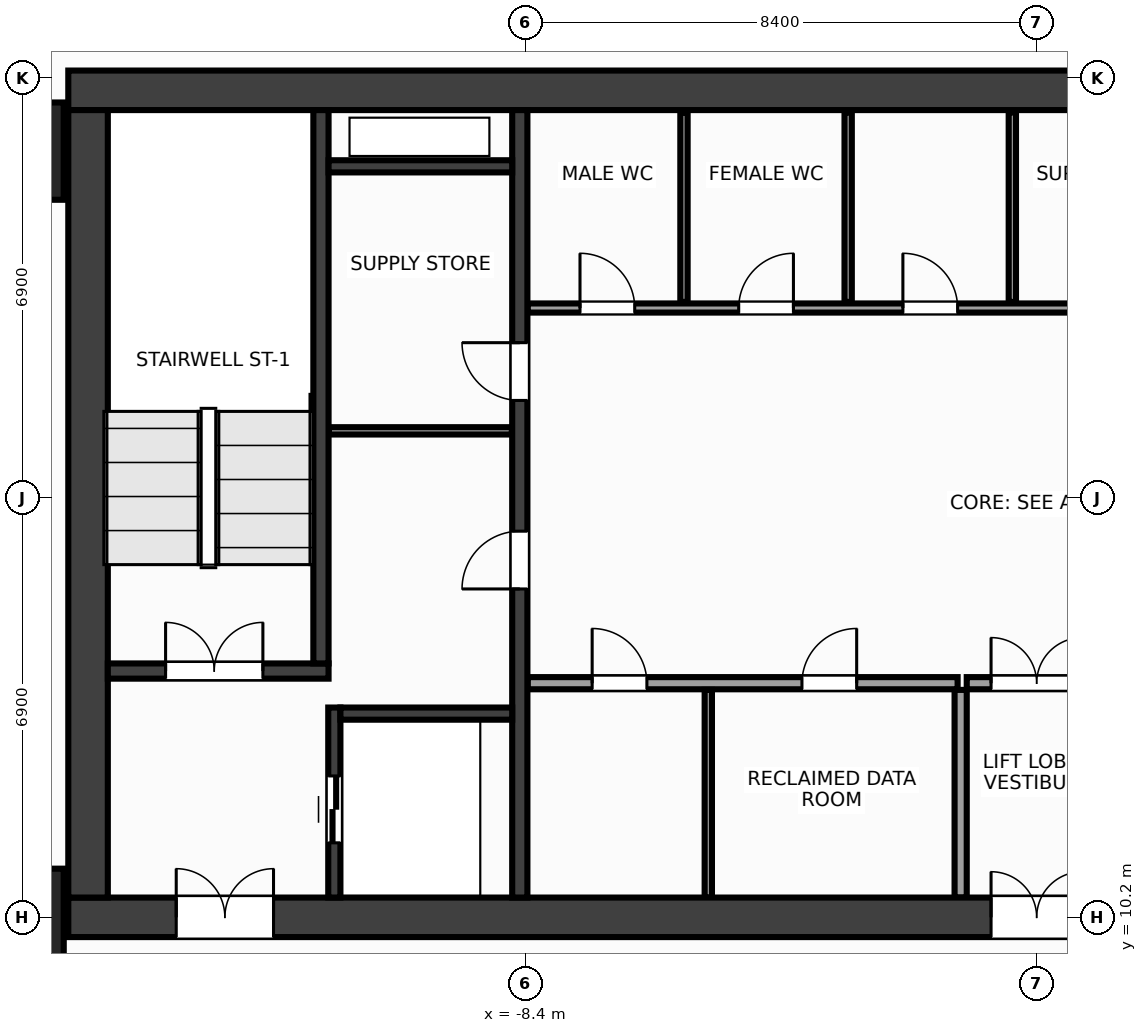
"""IFC4 building model, lengths in metres.
Left out: names, types, materials, properties, quantities, classifications, styles, units other than length and angle.
Written with IfcOpenShell. Run it as: python <this file> out.ifc"""

import sys

from ifc_helpers import new_model, si_unit, direction, frame, frame_2d, origin, origin_2d, place, context, subcontext, project, spatial, rectangle, extrude, source, transform, mapped, element, fill, save


model = new_model("IFC4")
c1 = context("Model", 3, precision=1e-05, world=origin(), true_north=direction((0.0, 1.0)))
c2 = subcontext(c1, "Body", "Model", "MODEL_VIEW")
j1 = project(units=[si_unit("LENGTHUNIT", "METRE"), si_unit("PLANEANGLEUNIT", "RADIAN")], contexts=[c1])
p1 = place(None, origin())
s1 = spatial("IfcSite", under=j1, at=p1, CompositionType="ELEMENT")
p2 = place(p1, origin())
s2 = spatial("IfcBuilding", under=s1, at=p2, CompositionType="ELEMENT")
p3 = place(p2, frame((0.0, 0.0, 92.0)))
s3 = spatial("IfcBuildingStorey", under=s2, at=p3, CompositionType="ELEMENT", Elevation=92.0)
m1 = source(origin(), c2, "Body", "SweptSolid", [
    extrude(rectangle(XDim=31.85, YDim=0.65, at=frame_2d((15.925, 0.0))), origin(), (0.0, 0.0, 1.0), 3.6),
])
p4 = place(p3, frame((-15.925, 23.8, 0.0), z_axis=(0.0, 0.0, 1.0), x_axis=(1.0, 0.0, 0.0)))
e1 = element("IfcWall", 1, at=p4, inside=s3, PredefinedType="SHEAR", context=c2, shape_type="MappedRepresentation", body=[
    mapped(m1, transform((0.0, 0.0, 0.0), x_axis=(1.0, 0.0, 0.0), y_axis=(0.0, 1.0, 0.0), z_axis=(0.0, 0.0, 1.0), scale=1.0)),
])
p5 = place(p3, frame((-15.925, 10.2, 0.0), z_axis=(0.0, 0.0, 1.0), x_axis=(1.0, 0.0, 0.0)))
e2 = element("IfcWall", 2, at=p5, inside=s3, PredefinedType="SHEAR", context=c2, shape_type="MappedRepresentation", body=[
    mapped(m1, transform((0.0, 0.0, 0.0), x_axis=(1.0, 0.0, 0.0), y_axis=(0.0, 1.0, 0.0), z_axis=(0.0, 0.0, 1.0), scale=1.0)),
])
p6 = place(p5, frame((1.775, 0.0, 0.0)))
e3 = element("IfcOpeningElement", 3, at=p6, cuts=e2, PredefinedType="OPENING", context=c2, shape_type="SweptSolid", body=[
    extrude(rectangle(XDim=1.6, YDim=2.15, at=frame_2d((0.8, 1.075))), frame((0.0, 0.337, 0.0), z_axis=(0.0, -1.0, 0.0), x_axis=(1.0, 0.0, 0.0)), (0.0, 0.0, 1.0), 0.674),
])
p7 = place(p5, frame((28.475, 0.0, 0.0)))
e4 = element("IfcOpeningElement", 4, at=p7, cuts=e2, PredefinedType="OPENING", context=c2, shape_type="SweptSolid", body=[
    extrude(rectangle(XDim=1.6, YDim=2.15, at=frame_2d((0.8, 1.075))), frame((0.0, 0.337, 0.0), z_axis=(0.0, -1.0, 0.0), x_axis=(1.0, 0.0, 0.0)), (0.0, 0.0, 1.0), 0.674),
])
p8 = place(p5, frame((15.175, 0.0, 0.0)))
e5 = element("IfcOpeningElement", 5, at=p8, cuts=e2, PredefinedType="OPENING", context=c2, shape_type="SweptSolid", body=[
    extrude(rectangle(XDim=1.5, YDim=2.2, at=frame_2d((0.75, 1.1))), frame((0.0, 0.337, 0.0), z_axis=(0.0, -1.0, 0.0), x_axis=(1.0, 0.0, 0.0)), (0.0, 0.0, 1.0), 0.674),
])
m2 = source(origin(), c2, "Body", "SweptSolid", [
    extrude(rectangle(XDim=12.95, YDim=0.65, at=frame_2d((6.475, 0.0))), origin(), (0.0, 0.0, 1.0), 3.6),
])
p9 = place(p3, frame((-15.6, 10.525, 0.0), z_axis=(0.0, 0.0, 1.0), x_axis=(0.0, 1.0, 0.0)))
e6 = element("IfcWall", 6, at=p9, inside=s3, PredefinedType="SHEAR", context=c2, shape_type="MappedRepresentation", body=[
    mapped(m2, transform((0.0, 0.0, 0.0), x_axis=(1.0, 0.0, 0.0), y_axis=(0.0, 1.0, 0.0), z_axis=(0.0, 0.0, 1.0), scale=1.0)),
])
m3 = source(origin(), c2, "Body", "SweptSolid", [
    extrude(rectangle(XDim=12.95, YDim=0.25, at=frame_2d((6.475, 0.0))), origin(), (0.0, 0.0, 1.0), 3.6),
])
p10 = place(p3, frame((-8.5, 10.525, 0.0), z_axis=(0.0, 0.0, 1.0), x_axis=(0.0, 1.0, 0.0)))
e7 = element("IfcWall", 7, at=p10, inside=s3, PredefinedType="SHEAR", context=c2, shape_type="MappedRepresentation", body=[
    mapped(m3, transform((0.0, 0.0, 0.0), x_axis=(1.0, 0.0, 0.0), y_axis=(0.0, 1.0, 0.0), z_axis=(0.0, 0.0, 1.0), scale=1.0)),
])
p11 = place(p10, frame((5.075, 0.0, 0.0)))
e8 = element("IfcOpeningElement", 8, at=p11, cuts=e7, PredefinedType="OPENING", context=c2, shape_type="SweptSolid", body=[
    extrude(rectangle(XDim=0.95, YDim=2.15, at=frame_2d((0.475, 1.075))), frame((0.0, 0.137, 0.0), z_axis=(0.0, -1.0, 0.0), x_axis=(1.0, 0.0, 0.0)), (0.0, 0.0, 1.0), 0.274),
])
p12 = place(p10, frame((8.175, 0.0, 0.0)))
e9 = element("IfcOpeningElement", 9, at=p12, cuts=e7, PredefinedType="OPENING", context=c2, shape_type="SweptSolid", body=[
    extrude(rectangle(XDim=0.95, YDim=2.15, at=frame_2d((0.475, 1.075))), frame((0.0, 0.137, 0.0), z_axis=(0.0, -1.0, 0.0), x_axis=(1.0, 0.0, 0.0)), (0.0, 0.0, 1.0), 0.274),
])
m4 = source(origin(), c2, "Body", "SweptSolid", [
    extrude(rectangle(XDim=3.63, YDim=0.25, at=frame_2d((1.815, 0.0))), origin(), (0.0, 0.0, 1.0), 3.6),
])
p13 = place(p3, frame((-15.275, 14.25, 0.0), z_axis=(0.0, 0.0, 1.0), x_axis=(1.0, 0.0, 0.0)))
e10 = element("IfcWall", 10, at=p13, inside=s3, PredefinedType="SHEAR", context=c2, shape_type="MappedRepresentation", body=[
    mapped(m4, transform((0.0, 0.0, 0.0), x_axis=(1.0, 0.0, 0.0), y_axis=(0.0, 1.0, 0.0), z_axis=(0.0, 0.0, 1.0), scale=1.0)),
])
p14 = place(p13, frame((0.95, 0.0, 0.0)))
e11 = element("IfcOpeningElement", 11, at=p14, cuts=e10, PredefinedType="OPENING", context=c2, shape_type="SweptSolid", body=[
    extrude(rectangle(XDim=1.6, YDim=2.15, at=frame_2d((0.8, 1.075))), frame((0.0, 0.137, 0.0), z_axis=(0.0, -1.0, 0.0), x_axis=(1.0, 0.0, 0.0)), (0.0, 0.0, 1.0), 0.274),
])
m5 = source(origin(), c2, "Body", "SweptSolid", [
    extrude(rectangle(XDim=9.1, YDim=0.25, at=frame_2d((4.55, 0.0))), origin(), (0.0, 0.0, 1.0), 3.6),
])
p15 = place(p3, frame((-11.77, 14.375, 0.0), z_axis=(0.0, 0.0, 1.0), x_axis=(0.0, 1.0, 0.0)))
e12 = element("IfcWall", 12, at=p15, inside=s3, PredefinedType="SHEAR", context=c2, shape_type="MappedRepresentation", body=[
    mapped(m5, transform((0.0, 0.0, 0.0), x_axis=(1.0, 0.0, 0.0), y_axis=(0.0, 1.0, 0.0), z_axis=(0.0, 0.0, 1.0), scale=1.0)),
])
m6 = source(origin(), c2, "Body", "SweptSolid", [
    extrude(rectangle(XDim=3.125, YDim=0.2, at=frame_2d((1.562, 0.0))), origin(), (0.0, 0.0, 1.0), 3.6),
])
p16 = place(p3, frame((-11.55, 10.525, 0.0), z_axis=(0.0, 0.0, 1.0), x_axis=(0.0, 1.0, 0.0)))
e13 = element("IfcWall", 13, at=p16, inside=s3, PredefinedType="SHEAR", context=c2, shape_type="MappedRepresentation", body=[
    mapped(m6, transform((0.0, 0.0, 0.0), x_axis=(1.0, 0.0, 0.0), y_axis=(0.0, 1.0, 0.0), z_axis=(0.0, 0.0, 1.0), scale=1.0)),
])
p17 = place(p16, frame((0.9, 0.0, 0.0)))
e14 = element("IfcOpeningElement", 14, at=p17, cuts=e13, PredefinedType="OPENING", context=c2, shape_type="SweptSolid", body=[
    extrude(rectangle(XDim=1.1, YDim=2.15, at=frame_2d((0.55, 1.075))), frame((0.0, 0.112, 0.0), z_axis=(0.0, -1.0, 0.0), x_axis=(1.0, 0.0, 0.0)), (0.0, 0.0, 1.0), 0.224),
])
m7 = source(origin(), c2, "Body", "SweptSolid", [
    extrude(rectangle(XDim=2.825, YDim=0.2, at=frame_2d((1.413, 0.0))), origin(), (0.0, 0.0, 1.0), 3.6),
])
p18 = place(p3, frame((-11.45, 13.55, 0.0), z_axis=(0.0, 0.0, 1.0), x_axis=(1.0, 0.0, 0.0)))
e15 = element("IfcWall", 15, at=p18, inside=s3, PredefinedType="SHEAR", context=c2, shape_type="MappedRepresentation", body=[
    mapped(m7, transform((0.0, 0.0, 0.0), x_axis=(1.0, 0.0, 0.0), y_axis=(0.0, 1.0, 0.0), z_axis=(0.0, 0.0, 1.0), scale=1.0)),
])
m8 = source(origin(), c2, "Body", "SweptSolid", [
    extrude(rectangle(XDim=3.02, YDim=0.2, at=frame_2d((1.51, 0.0))), origin(), (0.0, 0.0, 1.0), 3.6),
])
p19 = place(p3, frame((-11.645, 22.55, 0.0), z_axis=(0.0, 0.0, 1.0), x_axis=(1.0, 0.0, 0.0)))
e16 = element("IfcWall", 16, at=p19, inside=s3, PredefinedType="SHEAR", context=c2, shape_type="MappedRepresentation", body=[
    mapped(m8, transform((0.0, 0.0, 0.0), x_axis=(1.0, 0.0, 0.0), y_axis=(0.0, 1.0, 0.0), z_axis=(0.0, 0.0, 1.0), scale=1.0)),
])
m9 = source(origin(), c2, "Body", "SweptSolid", [
    extrude(rectangle(XDim=1.6, YDim=1.6, at=origin_2d()), origin(), (0.0, 0.0, 1.0), 3.6),
])
for number, where, z_axis, x_axis in (
    (17, (-16.8, 10.2, 0.0), (0.0, 0.0, 1.0), (1.0, 0.0, 0.0)),
    (18, (-16.8, 22.8, 0.0), (0.0, 0.0, 1.0), (1.0, 0.0, 0.0)),
):
    element("IfcColumn", number, at=place(p3, frame(where, z_axis=z_axis, x_axis=x_axis)), inside=s3, PredefinedType="COLUMN", context=c2, shape_type="MappedRepresentation", body=[
        mapped(m9, transform((0.0, 0.0, 0.0), x_axis=(1.0, 0.0, 0.0), y_axis=(0.0, 1.0, 0.0), z_axis=(0.0, 0.0, 1.0), scale=1.0)),
    ])
m10 = source(origin(), c2, "Body", "SweptSolid", [
    extrude(rectangle(XDim=3.01, YDim=0.12, at=frame_2d((1.505, 0.0))), origin(), (0.0, 0.0, 1.0), 3.36),
])
p20 = place(p3, frame((-11.64, 18.2, 0.0), z_axis=(0.0, 0.0, 1.0), x_axis=(1.0, 0.0, 0.0)))
e19 = element("IfcWall", 19, at=p20, inside=s3, PredefinedType="PARTITIONING", context=c2, shape_type="MappedRepresentation", body=[
    mapped(m10, transform((0.0, 0.0, 0.0), x_axis=(1.0, 0.0, 0.0), y_axis=(0.0, 1.0, 0.0), z_axis=(0.0, 0.0, 1.0), scale=1.0)),
])
m11 = source(origin(), c2, "Body", "SweptSolid", [
    extrude(rectangle(XDim=7.07, YDim=0.2, at=frame_2d((3.535, 0.0))), origin(), (0.0, 0.0, 1.0), 3.36),
])
p21 = place(p3, frame((-8.37, 14.05, 0.0), z_axis=(0.0, 0.0, 1.0), x_axis=(1.0, 0.0, 0.0)))
e20 = element("IfcWall", 20, at=p21, inside=s3, PredefinedType="PARTITIONING", context=c2, shape_type="MappedRepresentation", body=[
    mapped(m11, transform((0.0, 0.0, 0.0), x_axis=(1.0, 0.0, 0.0), y_axis=(0.0, 1.0, 0.0), z_axis=(0.0, 0.0, 1.0), scale=1.0)),
])
p22 = place(p21, frame((1.06, 0.0, 0.0)))
e21 = element("IfcOpeningElement", 21, at=p22, cuts=e20, PredefinedType="OPENING", context=c2, shape_type="SweptSolid", body=[
    extrude(rectangle(XDim=0.9, YDim=2.15, at=frame_2d((0.45, 1.075))), frame((0.0, 0.112, 0.0), z_axis=(0.0, -1.0, 0.0), x_axis=(1.0, 0.0, 0.0)), (0.0, 0.0, 1.0), 0.224),
])
p23 = place(p21, frame((4.51, 0.0, 0.0)))
e22 = element("IfcOpeningElement", 22, at=p23, cuts=e20, PredefinedType="OPENING", context=c2, shape_type="SweptSolid", body=[
    extrude(rectangle(XDim=0.9, YDim=2.15, at=frame_2d((0.45, 1.075))), frame((0.0, 0.112, 0.0), z_axis=(0.0, -1.0, 0.0), x_axis=(1.0, 0.0, 0.0)), (0.0, 0.0, 1.0), 0.224),
])
m12 = source(origin(), c2, "Body", "SweptSolid", [
    extrude(rectangle(XDim=3.415, YDim=0.2, at=frame_2d((1.708, 0.0))), origin(), (0.0, 0.0, 1.0), 3.36),
])
p24 = place(p3, frame((-1.25, 10.525, 0.0), z_axis=(0.0, 0.0, 1.0), x_axis=(0.0, 1.0, 0.0)))
e23 = element("IfcWall", 23, at=p24, inside=s3, PredefinedType="PARTITIONING", context=c2, shape_type="MappedRepresentation", body=[
    mapped(m12, transform((0.0, 0.0, 0.0), x_axis=(1.0, 0.0, 0.0), y_axis=(0.0, 1.0, 0.0), z_axis=(0.0, 0.0, 1.0), scale=1.0)),
])
m13 = source(origin(), c2, "Body", "SweptSolid", [
    extrude(rectangle(XDim=2.3, YDim=0.2, at=frame_2d((1.15, 0.0))), origin(), (0.0, 0.0, 1.0), 3.36),
])
p25 = place(p3, frame((-1.15, 14.05, 0.0), z_axis=(0.0, 0.0, 1.0), x_axis=(1.0, 0.0, 0.0)))
e24 = element("IfcWall", 24, at=p25, inside=s3, PredefinedType="PARTITIONING", context=c2, shape_type="MappedRepresentation", body=[
    mapped(m13, transform((0.0, 0.0, 0.0), x_axis=(1.0, 0.0, 0.0), y_axis=(0.0, 1.0, 0.0), z_axis=(0.0, 0.0, 1.0), scale=1.0)),
])
p26 = place(p25, frame((0.4, 0.0, 0.0)))
e25 = element("IfcOpeningElement", 25, at=p26, cuts=e24, PredefinedType="OPENING", context=c2, shape_type="SweptSolid", body=[
    extrude(rectangle(XDim=1.5, YDim=2.2, at=frame_2d((0.75, 1.1))), frame((0.0, 0.112, 0.0), z_axis=(0.0, -1.0, 0.0), x_axis=(1.0, 0.0, 0.0)), (0.0, 0.0, 1.0), 0.224),
])
m14 = source(origin(), c2, "Body", "SweptSolid", [
    extrude(rectangle(XDim=14.59, YDim=0.15, at=frame_2d((7.295, 0.0))), origin(), (0.0, 0.0, 1.0), 3.36),
])
p27 = place(p3, frame((-8.37, 20.22, 0.0), z_axis=(0.0, 0.0, 1.0), x_axis=(1.0, 0.0, 0.0)))
e26 = element("IfcWall", 26, at=p27, inside=s3, PredefinedType="PARTITIONING", context=c2, shape_type="MappedRepresentation", body=[
    mapped(m14, transform((0.0, 0.0, 0.0), x_axis=(1.0, 0.0, 0.0), y_axis=(0.0, 1.0, 0.0), z_axis=(0.0, 0.0, 1.0), scale=1.0)),
])
p28 = place(p27, frame((0.86, 0.0, 0.0)))
e27 = element("IfcOpeningElement", 27, at=p28, cuts=e26, PredefinedType="OPENING", context=c2, shape_type="SweptSolid", body=[
    extrude(rectangle(XDim=0.9, YDim=2.15, at=frame_2d((0.45, 1.075))), frame((0.0, 0.087, 0.0), z_axis=(0.0, -1.0, 0.0), x_axis=(1.0, 0.0, 0.0)), (0.0, 0.0, 1.0), 0.174),
])
p29 = place(p27, frame((3.47, 0.0, 0.0)))
e28 = element("IfcOpeningElement", 28, at=p29, cuts=e26, PredefinedType="OPENING", context=c2, shape_type="SweptSolid", body=[
    extrude(rectangle(XDim=0.9, YDim=2.15, at=frame_2d((0.45, 1.075))), frame((0.0, 0.087, 0.0), z_axis=(0.0, -1.0, 0.0), x_axis=(1.0, 0.0, 0.0)), (0.0, 0.0, 1.0), 0.174),
])
p30 = place(p27, frame((6.17, 0.0, 0.0)))
e29 = element("IfcOpeningElement", 29, at=p30, cuts=e26, PredefinedType="OPENING", context=c2, shape_type="SweptSolid", body=[
    extrude(rectangle(XDim=0.9, YDim=2.15, at=frame_2d((0.45, 1.075))), frame((0.0, 0.087, 0.0), z_axis=(0.0, -1.0, 0.0), x_axis=(1.0, 0.0, 0.0)), (0.0, 0.0, 1.0), 0.174),
])
p31 = place(p27, frame((9.07, 0.0, 0.0)))
e30 = element("IfcOpeningElement", 30, at=p31, cuts=e26, PredefinedType="OPENING", context=c2, shape_type="SweptSolid", body=[
    extrude(rectangle(XDim=0.9, YDim=2.15, at=frame_2d((0.45, 1.075))), frame((0.0, 0.087, 0.0), z_axis=(0.0, -1.0, 0.0), x_axis=(1.0, 0.0, 0.0)), (0.0, 0.0, 1.0), 0.174),
])
p32 = place(p27, frame((12.32, 0.0, 0.0)))
e31 = element("IfcOpeningElement", 31, at=p32, cuts=e26, PredefinedType="OPENING", context=c2, shape_type="SweptSolid", body=[
    extrude(rectangle(XDim=0.9, YDim=2.15, at=frame_2d((0.45, 1.075))), frame((0.0, 0.087, 0.0), z_axis=(0.0, -1.0, 0.0), x_axis=(1.0, 0.0, 0.0)), (0.0, 0.0, 1.0), 0.174),
])
m15 = source(origin(), c2, "Body", "SweptSolid", [
    extrude(rectangle(XDim=3.415, YDim=0.12, at=frame_2d((1.708, 0.0))), origin(), (0.0, 0.0, 1.0), 3.36),
])
p33 = place(p3, frame((-5.4, 10.525, 0.0), z_axis=(0.0, 0.0, 1.0), x_axis=(0.0, 1.0, 0.0)))
e32 = element("IfcWall", 32, at=p33, inside=s3, PredefinedType="PARTITIONING", context=c2, shape_type="MappedRepresentation", body=[
    mapped(m15, transform((0.0, 0.0, 0.0), x_axis=(1.0, 0.0, 0.0), y_axis=(0.0, 1.0, 0.0), z_axis=(0.0, 0.0, 1.0), scale=1.0)),
])
m16 = source(origin(), c2, "Body", "SweptSolid", [
    extrude(rectangle(XDim=3.115, YDim=0.12, at=frame_2d((1.558, 0.0))), origin(), (0.0, 0.0, 1.0), 3.36),
])
for number, where, z_axis, x_axis in (
    (33, (-5.8, 20.32, 0.0), (0.0, 0.0, 1.0), (0.0, 1.0, 0.0)),
    (34, (-3.1, 20.32, 0.0), (0.0, 0.0, 1.0), (0.0, 1.0, 0.0)),
    (35, (-0.4, 20.32, 0.0), (0.0, 0.0, 1.0), (0.0, 1.0, 0.0)),
):
    element("IfcWall", number, at=place(p3, frame(where, z_axis=z_axis, x_axis=x_axis)), inside=s3, PredefinedType="PARTITIONING", context=c2, shape_type="MappedRepresentation", body=[
        mapped(m16, transform((0.0, 0.0, 0.0), x_axis=(1.0, 0.0, 0.0), y_axis=(0.0, 1.0, 0.0), z_axis=(0.0, 0.0, 1.0), scale=1.0)),
    ])
m17 = source(origin(), c2, "Body", "SweptSolid", [
    extrude(rectangle(XDim=1.6, YDim=2.15, at=frame_2d((0.8, 1.075))), frame((0.0, 0.025, 0.0), z_axis=(0.0, -1.0, 0.0), x_axis=(1.0, 0.0, 0.0)), (0.0, 0.0, 1.0), 0.05),
])
p34 = place(p14, origin())
e36 = element("IfcDoor", 36, at=p34, inside=s3, OperationType="DOUBLE_DOOR_SINGLE_SWING", PredefinedType="DOOR", context=c2, shape_type="MappedRepresentation", body=[
    mapped(m17, transform((0.0, 0.0, 0.0), x_axis=(1.0, 0.0, 0.0), y_axis=(0.0, 1.0, 0.0), z_axis=(0.0, 0.0, 1.0), scale=1.0)),
])
fill(e11, e36)
p35 = place(p6, origin())
e37 = element("IfcDoor", 37, at=p35, inside=s3, OperationType="DOUBLE_DOOR_SINGLE_SWING", PredefinedType="DOOR", context=c2, shape_type="MappedRepresentation", body=[
    mapped(m17, transform((0.0, 0.0, 0.0), x_axis=(1.0, 0.0, 0.0), y_axis=(0.0, 1.0, 0.0), z_axis=(0.0, 0.0, 1.0), scale=1.0)),
])
fill(e3, e37)
m18 = source(origin(), c2, "Body", "SweptSolid", [
    extrude(rectangle(XDim=1.1, YDim=2.15, at=frame_2d((0.55, 1.075))), frame((0.0, 0.025, 0.0), z_axis=(0.0, -1.0, 0.0), x_axis=(1.0, 0.0, 0.0)), (0.0, 0.0, 1.0), 0.05),
])
p36 = place(p17, origin())
e38 = element("IfcDoor", 38, at=p36, inside=s3, OperationType="DOUBLE_DOOR_SLIDING", PredefinedType="DOOR", context=c2, shape_type="MappedRepresentation", body=[
    mapped(m18, transform((0.0, 0.0, 0.0), x_axis=(1.0, 0.0, 0.0), y_axis=(0.0, 1.0, 0.0), z_axis=(0.0, 0.0, 1.0), scale=1.0)),
])
fill(e14, e38)
m19 = source(origin(), c2, "Body", "SweptSolid", [
    extrude(rectangle(XDim=0.95, YDim=2.15, at=frame_2d((0.475, 1.075))), frame((0.0, 0.025, 0.0), z_axis=(0.0, -1.0, 0.0), x_axis=(1.0, 0.0, 0.0)), (0.0, 0.0, 1.0), 0.05),
])
p37 = place(p11, origin())
e39 = element("IfcDoor", 39, at=p37, inside=s3, OperationType="SINGLE_SWING_LEFT", PredefinedType="DOOR", context=c2, shape_type="MappedRepresentation", body=[
    mapped(m19, transform((0.0, 0.0, 0.0), x_axis=(1.0, 0.0, 0.0), y_axis=(0.0, 1.0, 0.0), z_axis=(0.0, 0.0, 1.0), scale=1.0)),
])
fill(e8, e39)
p38 = place(p12, origin())
e40 = element("IfcDoor", 40, at=p38, inside=s3, OperationType="SINGLE_SWING_RIGHT", PredefinedType="DOOR", context=c2, shape_type="MappedRepresentation", body=[
    mapped(m19, transform((0.0, 0.0, 0.0), x_axis=(1.0, 0.0, 0.0), y_axis=(0.0, 1.0, 0.0), z_axis=(0.0, 0.0, 1.0), scale=1.0)),
])
fill(e9, e40)
m20 = source(origin(), c2, "Body", "SweptSolid", [
    extrude(rectangle(XDim=0.9, YDim=2.15, at=frame_2d((0.45, 1.075))), frame((0.0, 0.025, 0.0), z_axis=(0.0, -1.0, 0.0), x_axis=(1.0, 0.0, 0.0)), (0.0, 0.0, 1.0), 0.05),
])
p39 = place(p22, origin())
e41 = element("IfcDoor", 41, at=p39, inside=s3, OperationType="SINGLE_SWING_LEFT", PredefinedType="DOOR", context=c2, shape_type="MappedRepresentation", body=[
    mapped(m20, transform((0.0, 0.0, 0.0), x_axis=(1.0, 0.0, 0.0), y_axis=(0.0, 1.0, 0.0), z_axis=(0.0, 0.0, 1.0), scale=1.0)),
])
fill(e21, e41)
p40 = place(p23, origin())
e42 = element("IfcDoor", 42, at=p40, inside=s3, OperationType="SINGLE_SWING_RIGHT", PredefinedType="DOOR", context=c2, shape_type="MappedRepresentation", body=[
    mapped(m20, transform((0.0, 0.0, 0.0), x_axis=(1.0, 0.0, 0.0), y_axis=(0.0, 1.0, 0.0), z_axis=(0.0, 0.0, 1.0), scale=1.0)),
])
fill(e22, e42)
m21 = source(origin(), c2, "Body", "SweptSolid", [
    extrude(rectangle(XDim=1.5, YDim=2.2, at=frame_2d((0.75, 1.1))), frame((0.0, 0.025, 0.0), z_axis=(0.0, -1.0, 0.0), x_axis=(1.0, 0.0, 0.0)), (0.0, 0.0, 1.0), 0.05),
])
p41 = place(p26, origin())
e43 = element("IfcDoor", 43, at=p41, inside=s3, OperationType="DOUBLE_DOOR_SINGLE_SWING", PredefinedType="DOOR", context=c2, shape_type="MappedRepresentation", body=[
    mapped(m21, transform((0.0, 0.0, 0.0), x_axis=(1.0, 0.0, 0.0), y_axis=(0.0, 1.0, 0.0), z_axis=(0.0, 0.0, 1.0), scale=1.0)),
])
fill(e25, e43)
p42 = place(p8, origin())
e44 = element("IfcDoor", 44, at=p42, inside=s3, OperationType="DOUBLE_DOOR_SINGLE_SWING", PredefinedType="DOOR", context=c2, shape_type="MappedRepresentation", body=[
    mapped(m21, transform((0.0, 0.0, 0.0), x_axis=(1.0, 0.0, 0.0), y_axis=(0.0, 1.0, 0.0), z_axis=(0.0, 0.0, 1.0), scale=1.0)),
])
fill(e5, e44)
p43 = place(p28, origin())
e45 = element("IfcDoor", 45, at=p43, inside=s3, OperationType="SINGLE_SWING_LEFT", PredefinedType="DOOR", context=c2, shape_type="MappedRepresentation", body=[
    mapped(m20, transform((0.0, 0.0, 0.0), x_axis=(1.0, 0.0, 0.0), y_axis=(0.0, 1.0, 0.0), z_axis=(0.0, 0.0, 1.0), scale=1.0)),
])
fill(e27, e45)
p44 = place(p29, origin())
e46 = element("IfcDoor", 46, at=p44, inside=s3, OperationType="SINGLE_SWING_RIGHT", PredefinedType="DOOR", context=c2, shape_type="MappedRepresentation", body=[
    mapped(m20, transform((0.0, 0.0, 0.0), x_axis=(1.0, 0.0, 0.0), y_axis=(0.0, 1.0, 0.0), z_axis=(0.0, 0.0, 1.0), scale=1.0)),
])
fill(e28, e46)
p45 = place(p30, origin())
e47 = element("IfcDoor", 47, at=p45, inside=s3, OperationType="SINGLE_SWING_LEFT", PredefinedType="DOOR", context=c2, shape_type="MappedRepresentation", body=[
    mapped(m20, transform((0.0, 0.0, 0.0), x_axis=(1.0, 0.0, 0.0), y_axis=(0.0, 1.0, 0.0), z_axis=(0.0, 0.0, 1.0), scale=1.0)),
])
fill(e29, e47)
save(model, sys.argv[1])
